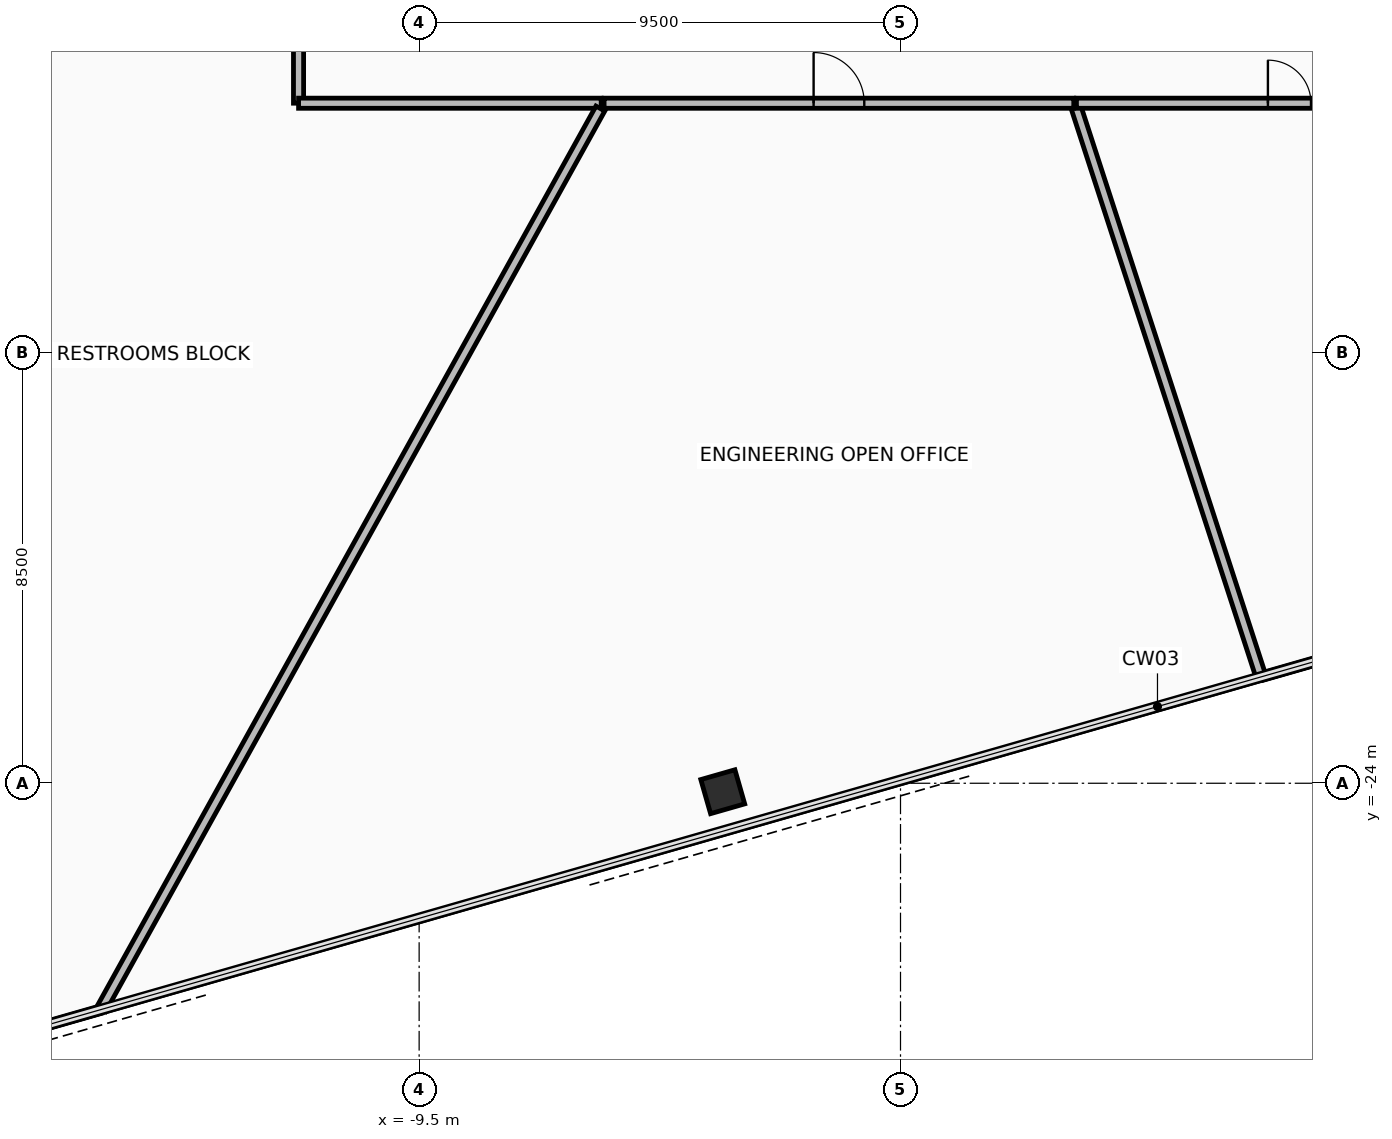
"""IFC4 building model, lengths in metres.
Left out: names, types, materials, properties, quantities, classifications, styles, units other than length and angle.
Written with IfcOpenShell. Run it as: python <this file> out.ifc"""

import sys

from ifc_helpers import new_model, si_unit, direction, frame, frame_2d, origin, origin_2d, place, context, subcontext, project, spatial, rectangle, hollow_rectangle, extrude, element, fill, save


model = new_model("IFC4")
c1 = context("Model", 3, precision=1e-05, world=origin(), true_north=direction((0.0, 1.0)))
c2 = subcontext(c1, "Body", "Model", "MODEL_VIEW")
j1 = project(units=[si_unit("LENGTHUNIT", "METRE"), si_unit("PLANEANGLEUNIT", "RADIAN")], contexts=[c1])
p1 = place(None, origin())
s1 = spatial("IfcSite", under=j1, at=p1, CompositionType="ELEMENT")
p2 = place(p1, origin())
s2 = spatial("IfcBuilding", under=s1, at=p2, CompositionType="ELEMENT")
p3 = place(p2, frame((0.0, 0.0, 96.9)))
s3 = spatial("IfcBuildingStorey", under=s2, at=p3, CompositionType="ELEMENT", Elevation=96.9)
p4 = place(p3, frame((-3.508, -24.167, 0.0), z_axis=(0.0, 0.0, 1.0), x_axis=(0.961261695938, 0.275637355817, 0.0)))
e1 = element("IfcColumn", 1, at=p4, inside=s3, PredefinedType="COLUMN", context=c2, shape_type="SweptSolid", body=[
    extrude(hollow_rectangle(XDim=0.7, YDim=0.7, WallThickness=0.04, at=origin_2d()), origin(), (0.0, 0.0, 1.0), 3.6),
])
p5 = place(p3, frame((-11.88, -2.34, 0.0), z_axis=(0.0, 0.0, 1.0), x_axis=(0.0, -1.0, 0.0)))
e2 = element("IfcWall", 2, at=p5, inside=s3, PredefinedType="PARTITIONING", context=c2, shape_type="SweptSolid", body=[
    extrude(rectangle(XDim=8.24, YDim=0.2, at=frame_2d((4.12, 0.0))), origin(), (0.0, 0.0, 1.0), 2.805),
])
p6 = place(p5, frame((3.695, 0.0, 0.0)))
e3 = element("IfcOpeningElement", 3, at=p6, cuts=e2, PredefinedType="OPENING", context=c2, shape_type="SweptSolid", body=[
    extrude(rectangle(XDim=0.85, YDim=2.1, at=frame_2d((0.425, 1.05))), frame((0.0, 0.11, 0.0), z_axis=(0.0, -1.0, 0.0), x_axis=(1.0, 0.0, 0.0)), (0.0, 0.0, 1.0), 0.22),
])
p7 = place(p3, frame((-11.879, -10.58, 0.0), z_axis=(0.0, 0.0, 1.0), x_axis=(1.0, 0.0, 0.0)))
e4 = element("IfcWall", 4, at=p7, inside=s3, PredefinedType="PARTITIONING", context=c2, shape_type="SweptSolid", body=[
    extrude(rectangle(XDim=5.972, YDim=0.2, at=frame_2d((2.986, 0.0))), origin(), (0.0, 0.0, 1.0), 2.805),
])
p8 = place(p3, frame((-5.923, -10.685, 0.0), z_axis=(0.0, 0.0, 1.0), x_axis=(-0.484811285835, -0.874618783886, 0.0)))
e5 = element("IfcWall", 5, at=p8, inside=s3, PredefinedType="PARTITIONING", context=c2, shape_type="SweptSolid", body=[
    extrude(rectangle(XDim=20.319, YDim=0.2, at=frame_2d((10.16, 0.0))), origin(), (0.0, 0.0, 1.0), 2.605),
])
p9 = place(p3, frame((-15.789, -28.469, 0.0), z_axis=(0.0, 0.0, 1.0), x_axis=(-0.96125788929, -0.275650630831, 0.0)))
e6 = element("IfcWall", 6, at=p9, inside=s3, PredefinedType="PARTITIONING", context=c2, shape_type="SweptSolid", body=[
    extrude(rectangle(XDim=5.55, YDim=0.15, at=frame_2d((2.775, 0.0))), origin(), (0.0, 0.0, 1.0), 3.41),
])
p10 = place(p3, frame((31.267, -14.976, 0.0), z_axis=(0.0, 0.0, 1.0), x_axis=(-0.961260697891, -0.275640836396, 0.0)))
e7 = element("IfcWall", 7, at=p10, inside=s3, PredefinedType="PARTITIONING", context=c2, shape_type="SweptSolid", body=[
    extrude(rectangle(XDim=25.1, YDim=0.15, at=frame_2d((12.55, 0.0))), origin(), (0.0, 0.0, 1.0), 3.41),
])
p11 = place(p3, frame((7.109, -21.878, 0.0), z_axis=(0.0, 0.0, 1.0), x_axis=(-0.309027348364, 0.951053152018, 0.0)))
e8 = element("IfcWall", 8, at=p11, inside=s3, PredefinedType="PARTITIONING", context=c2, shape_type="SweptSolid", body=[
    extrude(rectangle(XDim=11.845, YDim=0.2, at=frame_2d((5.922, 0.0))), origin(), (0.0, 0.0, 1.0), 2.605),
])
p12 = place(p3, frame((3.472, -10.58, 0.0), z_axis=(0.0, 0.0, 1.0), x_axis=(1.0, 0.0, 0.0)))
e9 = element("IfcWall", 9, at=p12, inside=s3, PredefinedType="PARTITIONING", context=c2, shape_type="SweptSolid", body=[
    extrude(rectangle(XDim=8.407, YDim=0.2, at=frame_2d((4.204, 0.0))), origin(), (0.0, 0.0, 1.0), 2.805),
])
p13 = place(p12, frame((3.779, 0.0, 0.0)))
e10 = element("IfcOpeningElement", 10, at=p13, cuts=e9, PredefinedType="OPENING", context=c2, shape_type="SweptSolid", body=[
    extrude(rectangle(XDim=0.85, YDim=2.1, at=frame_2d((0.425, 1.05))), frame((0.0, 0.11, 0.0), z_axis=(0.0, -1.0, 0.0), x_axis=(1.0, 0.0, 0.0)), (0.0, 0.0, 1.0), 0.22),
])
p14 = place(p3, frame((-5.85, -10.58, 0.0), z_axis=(0.0, 0.0, 1.0), x_axis=(1.0, 0.0, 0.0)))
e11 = element("IfcWall", 11, at=p14, inside=s3, PredefinedType="PARTITIONING", context=c2, shape_type="SweptSolid", body=[
    extrude(rectangle(XDim=9.269, YDim=0.2, at=frame_2d((4.635, 0.0))), origin(), (0.0, 0.0, 1.0), 2.805),
])
p15 = place(p14, frame((4.135, 0.0, 0.0)))
e12 = element("IfcOpeningElement", 12, at=p15, cuts=e11, PredefinedType="OPENING", context=c2, shape_type="SweptSolid", body=[
    extrude(rectangle(XDim=1.0, YDim=2.15, at=frame_2d((0.5, 1.075))), frame((0.0, 0.11, 0.0), z_axis=(0.0, -1.0, 0.0), x_axis=(1.0, 0.0, 0.0)), (0.0, 0.0, 1.0), 0.22),
])
p16 = place(p13, origin())
e13 = element("IfcDoor", 13, at=p16, inside=s3, OperationType="SINGLE_SWING_RIGHT", PredefinedType="DOOR", context=c2, shape_type="SweptSolid", body=[
    extrude(rectangle(XDim=0.85, YDim=2.1, at=frame_2d((0.425, 1.05))), frame((0.0, 0.025, 0.0), z_axis=(0.0, -1.0, 0.0), x_axis=(1.0, 0.0, 0.0)), (0.0, 0.0, 1.0), 0.05),
])
fill(e10, e13)
p17 = place(p15, origin())
e14 = element("IfcDoor", 14, at=p17, inside=s3, OperationType="SINGLE_SWING_RIGHT", PredefinedType="DOOR", context=c2, shape_type="SweptSolid", body=[
    extrude(rectangle(XDim=1.0, YDim=2.15, at=frame_2d((0.5, 1.075))), frame((0.0, 0.025, 0.0), z_axis=(0.0, -1.0, 0.0), x_axis=(1.0, 0.0, 0.0)), (0.0, 0.0, 1.0), 0.05),
])
fill(e12, e14)
save(model, sys.argv[1])
